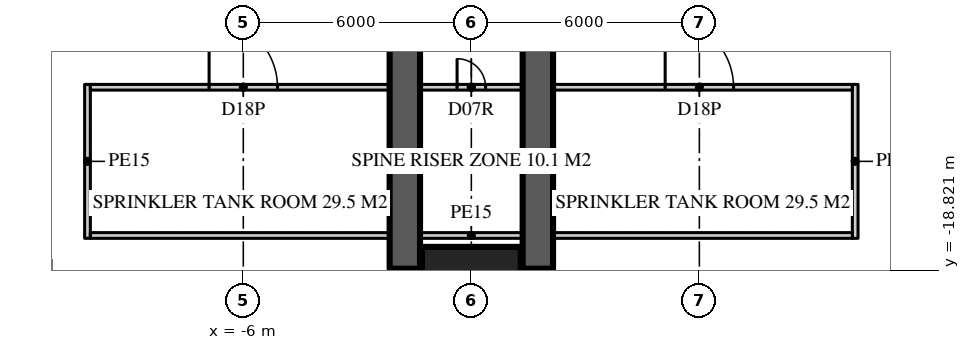
"""IFC4 building model, lengths in metres.
Left out: names, types, materials, properties, quantities, classifications, styles, units other than length and angle.
Written with IfcOpenShell. Run it as: python <this file> out.ifc"""

import sys

from ifc_helpers import new_model, si_unit, direction, frame, frame_2d, origin, origin_2d, place, context, subcontext, project, spatial, rectangle, extrude, element, fill, save


model = new_model("IFC4")
c1 = context("Model", 3, precision=1e-05, world=origin(), true_north=direction((0.0, 1.0)))
c2 = subcontext(c1, "Body", "Model", "MODEL_VIEW")
j1 = project(units=[si_unit("LENGTHUNIT", "METRE"), si_unit("PLANEANGLEUNIT", "RADIAN")], contexts=[c1])
p1 = place(None, origin())
s1 = spatial("IfcSite", under=j1, at=p1, CompositionType="ELEMENT")
p2 = place(p1, origin())
s2 = spatial("IfcBuilding", under=s1, at=p2, CompositionType="ELEMENT")
p3 = place(p2, frame((0.0, 0.0, -10.0)))
s3 = spatial("IfcBuildingStorey", under=s2, at=p3, CompositionType="ELEMENT", Elevation=-10.0)
for number, where, z_axis, x_axis in (
    (1, (-1.75, -11.15, 0.0), (0.0, 0.0, 1.0), (0.0, -1.0, 0.0)),
    (2, (1.75, -11.15, 0.0), (0.0, 0.0, 1.0), (0.0, -1.0, 0.0)),
):
    element("IfcWall", number, at=place(p3, frame(where, z_axis=z_axis, x_axis=x_axis)), inside=s3, PredefinedType="SHEAR", context=c2, shape_type="SweptSolid", body=[
        extrude(rectangle(XDim=7.625, YDim=0.8, at=frame_2d((3.812, 0.0))), origin(), (0.0, 0.0, 1.0), 5.0),
    ])
p4 = place(p3, frame((0.0, -19.5, 0.0), z_axis=(0.0, 0.0, 1.0), x_axis=(1.0, 0.0, 0.0)))
e3 = element("IfcColumn", 3, at=p4, inside=s3, PredefinedType="COLUMN", context=c2, shape_type="SweptSolid", body=[
    extrude(rectangle(XDim=2.6, YDim=2.6, at=origin_2d()), origin(), (0.0, 0.0, 1.0), 5.0),
])
for number, where, z_axis, x_axis in (
    (4, (-10.1, -13.925, 0.0), (0.0, 0.0, 1.0), (0.0, -1.0, 0.0)),
    (5, (10.1, -13.925, 0.0), (0.0, 0.0, 1.0), (0.0, -1.0, 0.0)),
):
    element("IfcWall", number, at=place(p3, frame(where, z_axis=z_axis, x_axis=x_axis)), inside=s3, PredefinedType="SOLIDWALL", context=c2, shape_type="SweptSolid", body=[
        extrude(rectangle(XDim=4.05, YDim=0.15, at=frame_2d((2.025, 0.0))), origin(), (0.0, 0.0, 1.0), 4.7),
    ])
p5 = place(p3, frame((-10.025, -17.9, 0.0), z_axis=(0.0, 0.0, 1.0), x_axis=(1.0, 0.0, 0.0)))
e6 = element("IfcWall", 6, at=p5, inside=s3, PredefinedType="SOLIDWALL", context=c2, shape_type="SweptSolid", body=[
    extrude(rectangle(XDim=20.05, YDim=0.15, at=frame_2d((10.025, 0.0))), origin(), (0.0, 0.0, 1.0), 4.7),
])
p6 = place(p3, frame((-10.025, -14.0, 0.0), z_axis=(0.0, 0.0, 1.0), x_axis=(1.0, 0.0, 0.0)))
e7 = element("IfcWall", 7, at=p6, inside=s3, PredefinedType="SOLIDWALL", context=c2, shape_type="SweptSolid", body=[
    extrude(rectangle(XDim=20.05, YDim=0.15, at=frame_2d((10.025, 0.0))), origin(), (0.0, 0.0, 1.0), 4.7),
])
p7 = place(p6, frame((9.65, 0.0, 0.0)))
e8 = element("IfcOpeningElement", 8, at=p7, cuts=e7, PredefinedType="OPENING", context=c2, shape_type="SweptSolid", body=[
    extrude(rectangle(XDim=0.75, YDim=2.1, at=frame_2d((0.375, 1.05))), frame((0.0, 0.085, 0.0), z_axis=(0.0, -1.0, 0.0), x_axis=(1.0, 0.0, 0.0)), (0.0, 0.0, 1.0), 0.17),
])
p8 = place(p6, frame((3.125, 0.0, 0.0)))
e9 = element("IfcOpeningElement", 9, at=p8, cuts=e7, PredefinedType="OPENING", context=c2, shape_type="SweptSolid", body=[
    extrude(rectangle(XDim=1.8, YDim=2.4, at=frame_2d((0.9, 1.2))), frame((0.0, 0.085, 0.0), z_axis=(0.0, -1.0, 0.0), x_axis=(1.0, 0.0, 0.0)), (0.0, 0.0, 1.0), 0.17),
])
p9 = place(p6, frame((15.125, 0.0, 0.0)))
e10 = element("IfcOpeningElement", 10, at=p9, cuts=e7, PredefinedType="OPENING", context=c2, shape_type="SweptSolid", body=[
    extrude(rectangle(XDim=1.8, YDim=2.4, at=frame_2d((0.9, 1.2))), frame((0.0, 0.085, 0.0), z_axis=(0.0, -1.0, 0.0), x_axis=(1.0, 0.0, 0.0)), (0.0, 0.0, 1.0), 0.17),
])
p10 = place(p7, origin())
e11 = element("IfcDoor", 11, at=p10, inside=s3, OperationType="SINGLE_SWING_LEFT", PredefinedType="DOOR", context=c2, shape_type="SweptSolid", body=[
    extrude(rectangle(XDim=0.75, YDim=2.1, at=frame_2d((0.375, 1.05))), frame((0.0, 0.025, 0.0), z_axis=(0.0, -1.0, 0.0), x_axis=(1.0, 0.0, 0.0)), (0.0, 0.0, 1.0), 0.05),
])
fill(e8, e11)
p11 = place(p8, origin())
e12 = element("IfcDoor", 12, at=p11, inside=s3, OperationType="DOUBLE_DOOR_DOUBLE_SWING", PredefinedType="DOOR", context=c2, shape_type="SweptSolid", body=[
    extrude(rectangle(XDim=1.8, YDim=2.4, at=frame_2d((0.9, 1.2))), frame((0.0, 0.025, 0.0), z_axis=(0.0, -1.0, 0.0), x_axis=(1.0, 0.0, 0.0)), (0.0, 0.0, 1.0), 0.05),
])
fill(e9, e12)
p12 = place(p9, origin())
e13 = element("IfcDoor", 13, at=p12, inside=s3, OperationType="DOUBLE_DOOR_DOUBLE_SWING", PredefinedType="DOOR", context=c2, shape_type="SweptSolid", body=[
    extrude(rectangle(XDim=1.8, YDim=2.4, at=frame_2d((0.9, 1.2))), frame((0.0, 0.025, 0.0), z_axis=(0.0, -1.0, 0.0), x_axis=(1.0, 0.0, 0.0)), (0.0, 0.0, 1.0), 0.05),
])
fill(e10, e13)
save(model, sys.argv[1])
